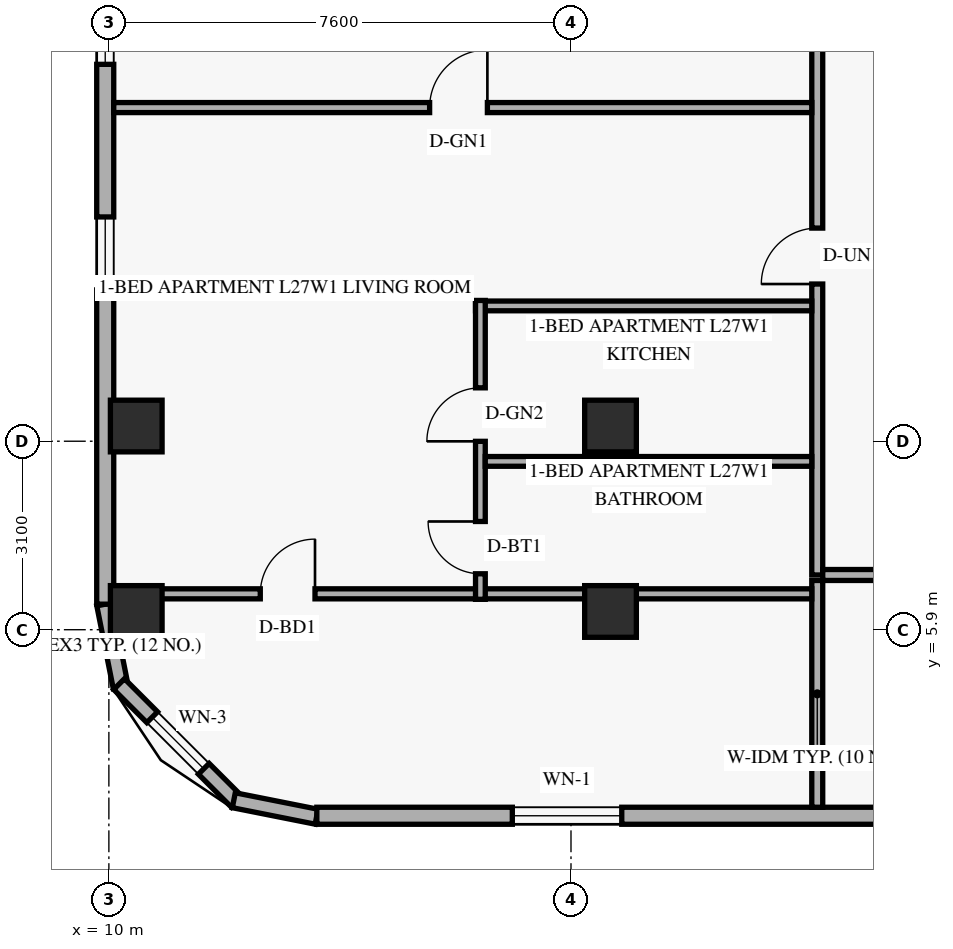
"""IFC4 building model, lengths in metres.
Left out: names, types, materials, properties, quantities, classifications, styles, units other than length and angle.
Written with IfcOpenShell. Run it as: python <this file> out.ifc"""

import sys

from ifc_helpers import new_model, si_unit, direction, frame, frame_2d, origin, origin_2d, place, context, subcontext, project, spatial, rectangle, extrude, element, fill, save


model = new_model("IFC4")
c1 = context("Model", 3, precision=1e-05, world=origin(), true_north=direction((0.0, 1.0)))
c2 = subcontext(c1, "Body", "Model", "MODEL_VIEW")
j1 = project(units=[si_unit("LENGTHUNIT", "METRE"), si_unit("PLANEANGLEUNIT", "RADIAN")], contexts=[c1])
p1 = place(None, origin())
s1 = spatial("IfcSite", under=j1, at=p1, CompositionType="ELEMENT")
p2 = place(p1, origin())
s2 = spatial("IfcBuilding", under=s1, at=p2, CompositionType="ELEMENT")
p3 = place(p2, frame((0.0, 0.0, 106.2)))
s3 = spatial("IfcBuildingStorey", under=s2, at=p3, CompositionType="ELEMENT", Elevation=106.2)
for number, where, z_axis, x_axis in (
    (1, (10.45, 6.2, 0.0), (0.0, 0.0, 1.0), (1.0, 0.0, 0.0)),
    (2, (10.45, 9.25, 0.0), (0.0, 0.0, 1.0), (1.0, 0.0, 0.0)),
    (3, (18.25, 6.2, 0.0), (0.0, 0.0, 1.0), (1.0, 0.0, 0.0)),
    (4, (18.25, 9.25, 0.0), (0.0, 0.0, 1.0), (1.0, 0.0, 0.0)),
):
    element("IfcColumn", number, at=place(p3, frame(where, z_axis=z_axis, x_axis=x_axis)), inside=s3, PredefinedType="COLUMN", context=c2, shape_type="SweptSolid", body=[
        extrude(rectangle(XDim=0.85, YDim=0.85, at=origin_2d()), origin(), (0.0, 0.0, 1.0), 3.6),
    ])
p4 = place(p3, frame((9.924, 6.316, 0.0), z_axis=(0.0, 0.0, 1.0), x_axis=(0.195000137217, -0.980803214965, 0.0)))
e5 = element("IfcWall", 5, at=p4, inside=s3, PredefinedType="SOLIDWALL", context=c2, shape_type="SweptSolid", body=[
    extrude(rectangle(XDim=1.388, YDim=0.25, at=frame_2d((0.694, 0.0))), origin(), (0.0, 0.0, 1.0), 3.36),
])
p5 = place(p3, frame((10.168, 5.005, 0.0), z_axis=(0.0, 0.0, 1.0), x_axis=(0.707151344399, -0.707062215165, 0.0)))
e6 = element("IfcWall", 6, at=p5, inside=s3, PredefinedType="SOLIDWALL", context=c2, shape_type="SweptSolid", body=[
    extrude(rectangle(XDim=2.739, YDim=0.25, at=frame_2d((1.37, 0.0))), origin(), (0.0, 0.0, 1.0), 3.36),
])
p6 = place(p5, frame((0.77, 0.0, 0.85)))
e7 = element("IfcOpeningElement", 7, at=p6, cuts=e6, PredefinedType="OPENING", context=c2, shape_type="SweptSolid", body=[
    extrude(rectangle(XDim=1.2, YDim=1.5, at=frame_2d((0.6, 0.75))), frame((0.0, 0.135, 0.0), z_axis=(0.0, -1.0, 0.0), x_axis=(1.0, 0.0, 0.0)), (0.0, 0.0, 1.0), 0.27),
])
p7 = place(p3, frame((12.054, 3.095, 0.0), z_axis=(0.0, 0.0, 1.0), x_axis=(0.980809899341, -0.19496651342, 0.0)))
e8 = element("IfcWall", 8, at=p7, inside=s3, PredefinedType="SOLIDWALL", context=c2, shape_type="SweptSolid", body=[
    extrude(rectangle(XDim=1.389, YDim=0.25, at=frame_2d((0.694, 0.0))), origin(), (0.0, 0.0, 1.0), 3.36),
])
p8 = place(p3, frame((13.42, 2.84, 0.0), z_axis=(0.0, 0.0, 1.0), x_axis=(1.0, 0.0, 0.0)))
e9 = element("IfcWall", 9, at=p8, inside=s3, PredefinedType="SOLIDWALL", context=c2, shape_type="SweptSolid", body=[
    extrude(rectangle(XDim=36.56, YDim=0.28, at=frame_2d((18.28, 0.0))), origin(), (0.0, 0.0, 1.0), 3.36),
])
p9 = place(p8, frame((3.215, 0.0, 0.85)))
e10 = element("IfcOpeningElement", 10, at=p9, cuts=e9, PredefinedType="OPENING", context=c2, shape_type="SweptSolid", body=[
    extrude(rectangle(XDim=1.8, YDim=1.6, at=frame_2d((0.9, 0.8))), frame((0.0, 0.15, 0.0), z_axis=(0.0, -1.0, 0.0), x_axis=(1.0, 0.0, 0.0)), (0.0, 0.0, 1.0), 0.3),
])
p10 = place(p8, frame((10.055, 0.0, 0.85)))
e11 = element("IfcOpeningElement", 11, at=p10, cuts=e9, PredefinedType="OPENING", context=c2, shape_type="SweptSolid", body=[
    extrude(rectangle(XDim=1.8, YDim=1.6, at=frame_2d((0.9, 0.8))), frame((0.0, 0.15, 0.0), z_axis=(0.0, -1.0, 0.0), x_axis=(1.0, 0.0, 0.0)), (0.0, 0.0, 1.0), 0.3),
])
p11 = place(p8, frame((16.94, 0.0, 0.85)))
e12 = element("IfcOpeningElement", 12, at=p11, cuts=e9, PredefinedType="OPENING", context=c2, shape_type="SweptSolid", body=[
    extrude(rectangle(XDim=1.8, YDim=1.6, at=frame_2d((0.9, 0.8))), frame((0.0, 0.15, 0.0), z_axis=(0.0, -1.0, 0.0), x_axis=(1.0, 0.0, 0.0)), (0.0, 0.0, 1.0), 0.3),
])
p12 = place(p8, frame((22.365, 0.0, 0.85)))
e13 = element("IfcOpeningElement", 13, at=p12, cuts=e9, PredefinedType="OPENING", context=c2, shape_type="SweptSolid", body=[
    extrude(rectangle(XDim=1.8, YDim=1.6, at=frame_2d((0.9, 0.8))), frame((0.0, 0.15, 0.0), z_axis=(0.0, -1.0, 0.0), x_axis=(1.0, 0.0, 0.0)), (0.0, 0.0, 1.0), 0.3),
])
p13 = place(p8, frame((27.455, 0.0, 0.85)))
e14 = element("IfcOpeningElement", 14, at=p13, cuts=e9, PredefinedType="OPENING", context=c2, shape_type="SweptSolid", body=[
    extrude(rectangle(XDim=1.8, YDim=1.6, at=frame_2d((0.9, 0.8))), frame((0.0, 0.15, 0.0), z_axis=(0.0, -1.0, 0.0), x_axis=(1.0, 0.0, 0.0)), (0.0, 0.0, 1.0), 0.3),
])
p14 = place(p8, frame((32.48, 0.0, 0.85)))
e15 = element("IfcOpeningElement", 15, at=p14, cuts=e9, PredefinedType="OPENING", context=c2, shape_type="SweptSolid", body=[
    extrude(rectangle(XDim=1.2, YDim=1.5, at=frame_2d((0.6, 0.75))), frame((0.0, 0.15, 0.0), z_axis=(0.0, -1.0, 0.0), x_axis=(1.0, 0.0, 0.0)), (0.0, 0.0, 1.0), 0.3),
])
p15 = place(p8, frame((34.37, 0.0, 0.85)))
e16 = element("IfcOpeningElement", 16, at=p15, cuts=e9, PredefinedType="OPENING", context=c2, shape_type="SweptSolid", body=[
    extrude(rectangle(XDim=1.8, YDim=1.6, at=frame_2d((0.9, 0.8))), frame((0.0, 0.15, 0.0), z_axis=(0.0, -1.0, 0.0), x_axis=(1.0, 0.0, 0.0)), (0.0, 0.0, 1.0), 0.3),
])
p16 = place(p3, frame((9.94, 41.68, 0.0), z_axis=(0.0, 0.0, 1.0), x_axis=(0.0, -1.0, 0.0)))
e17 = element("IfcWall", 17, at=p16, inside=s3, PredefinedType="SOLIDWALL", context=c2, shape_type="SweptSolid", body=[
    extrude(rectangle(XDim=35.36, YDim=0.28, at=frame_2d((17.68, 0.0))), origin(), (0.0, 0.0, 1.0), 3.36),
])
p17 = place(p16, frame((28.991, 0.0, 0.85)))
e18 = element("IfcOpeningElement", 18, at=p17, cuts=e17, PredefinedType="OPENING", context=c2, shape_type="SweptSolid", body=[
    extrude(rectangle(XDim=1.2, YDim=1.5, at=frame_2d((0.6, 0.75))), frame((0.0, 0.15, 0.0), z_axis=(0.0, -1.0, 0.0), x_axis=(1.0, 0.0, 0.0)), (0.0, 0.0, 1.0), 0.3),
])
p18 = place(p16, frame((25.281, 0.0, 0.85)))
e19 = element("IfcOpeningElement", 19, at=p18, cuts=e17, PredefinedType="OPENING", context=c2, shape_type="SweptSolid", body=[
    extrude(rectangle(XDim=1.2, YDim=1.5, at=frame_2d((0.6, 0.75))), frame((0.0, 0.15, 0.0), z_axis=(0.0, -1.0, 0.0), x_axis=(1.0, 0.0, 0.0)), (0.0, 0.0, 1.0), 0.3),
])
p19 = place(p16, frame((20.548, 0.0, 0.85)))
e20 = element("IfcOpeningElement", 20, at=p19, cuts=e17, PredefinedType="OPENING", context=c2, shape_type="SweptSolid", body=[
    extrude(rectangle(XDim=1.2, YDim=1.5, at=frame_2d((0.6, 0.75))), frame((0.0, 0.15, 0.0), z_axis=(0.0, -1.0, 0.0), x_axis=(1.0, 0.0, 0.0)), (0.0, 0.0, 1.0), 0.3),
])
p20 = place(p16, frame((14.663, 0.0, 0.85)))
e21 = element("IfcOpeningElement", 21, at=p20, cuts=e17, PredefinedType="OPENING", context=c2, shape_type="SweptSolid", body=[
    extrude(rectangle(XDim=1.2, YDim=1.5, at=frame_2d((0.6, 0.75))), frame((0.0, 0.15, 0.0), z_axis=(0.0, -1.0, 0.0), x_axis=(1.0, 0.0, 0.0)), (0.0, 0.0, 1.0), 0.3),
])
p21 = place(p16, frame((8.167, 0.0, 0.85)))
e22 = element("IfcOpeningElement", 22, at=p21, cuts=e17, PredefinedType="OPENING", context=c2, shape_type="SweptSolid", body=[
    extrude(rectangle(XDim=1.2, YDim=1.5, at=frame_2d((0.6, 0.75))), frame((0.0, 0.15, 0.0), z_axis=(0.0, -1.0, 0.0), x_axis=(1.0, 0.0, 0.0)), (0.0, 0.0, 1.0), 0.3),
])
p22 = place(p16, frame((4.846, 0.0, 0.85)))
e23 = element("IfcOpeningElement", 23, at=p22, cuts=e17, PredefinedType="OPENING", context=c2, shape_type="SweptSolid", body=[
    extrude(rectangle(XDim=1.2, YDim=1.5, at=frame_2d((0.6, 0.75))), frame((0.0, 0.15, 0.0), z_axis=(0.0, -1.0, 0.0), x_axis=(1.0, 0.0, 0.0)), (0.0, 0.0, 1.0), 0.3),
])
p23 = place(p3, frame((21.65, 6.8, 0.0), z_axis=(0.0, 0.0, 1.0), x_axis=(0.0, 1.0, 0.0)))
e24 = element("IfcWall", 24, at=p23, inside=s3, PredefinedType="STANDARD", context=c2, shape_type="SweptSolid", body=[
    extrude(rectangle(XDim=34.4, YDim=0.18, at=frame_2d((17.2, 0.0))), origin(), (0.0, 0.0, 1.0), 2.731),
])
p24 = place(p23, frame((4.785, 0.0, 0.0)))
e25 = element("IfcOpeningElement", 25, at=p24, cuts=e24, PredefinedType="OPENING", context=c2, shape_type="SweptSolid", body=[
    extrude(rectangle(XDim=0.92, YDim=2.15, at=frame_2d((0.46, 1.075))), frame((0.0, 0.1, 0.0), z_axis=(0.0, -1.0, 0.0), x_axis=(1.0, 0.0, 0.0)), (0.0, 0.0, 1.0), 0.2),
])
p25 = place(p23, frame((15.384, 0.0, 0.0)))
e26 = element("IfcOpeningElement", 26, at=p25, cuts=e24, PredefinedType="OPENING", context=c2, shape_type="SweptSolid", body=[
    extrude(rectangle(XDim=0.92, YDim=2.15, at=frame_2d((0.46, 1.075))), frame((0.0, 0.1, 0.0), z_axis=(0.0, -1.0, 0.0), x_axis=(1.0, 0.0, 0.0)), (0.0, 0.0, 1.0), 0.2),
])
p26 = place(p23, frame((28.41, 0.0, 0.0)))
e27 = element("IfcOpeningElement", 27, at=p26, cuts=e24, PredefinedType="OPENING", context=c2, shape_type="SweptSolid", body=[
    extrude(rectangle(XDim=0.92, YDim=2.15, at=frame_2d((0.46, 1.075))), frame((0.0, 0.1, 0.0), z_axis=(0.0, -1.0, 0.0), x_axis=(1.0, 0.0, 0.0)), (0.0, 0.0, 1.0), 0.2),
])
p27 = place(p3, frame((21.74, 6.8, 0.0), z_axis=(0.0, 0.0, 1.0), x_axis=(1.0, 0.0, 0.0)))
e28 = element("IfcWall", 28, at=p27, inside=s3, PredefinedType="STANDARD", context=c2, shape_type="SweptSolid", body=[
    extrude(rectangle(XDim=13.68, YDim=0.18, at=frame_2d((6.84, 0.0))), origin(), (0.0, 0.0, 1.0), 2.731),
])
p28 = place(p27, frame((0.97, 0.0, 0.0)))
e29 = element("IfcOpeningElement", 29, at=p28, cuts=e28, PredefinedType="OPENING", context=c2, shape_type="SweptSolid", body=[
    extrude(rectangle(XDim=0.95, YDim=2.15, at=frame_2d((0.475, 1.075))), frame((0.0, 0.1, 0.0), z_axis=(0.0, -1.0, 0.0), x_axis=(1.0, 0.0, 0.0)), (0.0, 0.0, 1.0), 0.2),
])
p29 = place(p27, frame((9.11, 0.0, 0.0)))
e30 = element("IfcOpeningElement", 30, at=p29, cuts=e28, PredefinedType="OPENING", context=c2, shape_type="SweptSolid", body=[
    extrude(rectangle(XDim=0.95, YDim=2.15, at=frame_2d((0.475, 1.075))), frame((0.0, 0.1, 0.0), z_axis=(0.0, -1.0, 0.0), x_axis=(1.0, 0.0, 0.0)), (0.0, 0.0, 1.0), 0.2),
])
p30 = place(p3, frame((21.65, 2.98, 0.0), z_axis=(0.0, 0.0, 1.0), x_axis=(0.0, 1.0, 0.0)))
e31 = element("IfcWall", 31, at=p30, inside=s3, PredefinedType="PARTITIONING", context=c2, shape_type="SweptSolid", body=[
    extrude(rectangle(XDim=3.73, YDim=0.18, at=frame_2d((1.865, 0.0))), origin(), (0.0, 0.0, 1.0), 2.809),
])
p31 = place(p3, frame((10.08, 6.49, 0.0), z_axis=(0.0, 0.0, 1.0), x_axis=(1.0, 0.0, 0.0)))
e32 = element("IfcWall", 32, at=p31, inside=s3, PredefinedType="PARTITIONING", context=c2, shape_type="SweptSolid", body=[
    extrude(rectangle(XDim=11.48, YDim=0.165, at=frame_2d((5.74, 0.0))), origin(), (0.0, 0.0, 1.0), 3.36),
])
p32 = place(p31, frame((2.41, 0.0, 0.0)))
e33 = element("IfcOpeningElement", 33, at=p32, cuts=e32, PredefinedType="OPENING", context=c2, shape_type="SweptSolid", body=[
    extrude(rectangle(XDim=0.9, YDim=2.14, at=frame_2d((0.45, 1.07))), frame((0.0, 0.093, 0.0), z_axis=(0.0, -1.0, 0.0), x_axis=(1.0, 0.0, 0.0)), (0.0, 0.0, 1.0), 0.185),
])
p33 = place(p3, frame((16.03, 11.226, 0.0), z_axis=(0.0, 0.0, 1.0), x_axis=(1.0, 0.0, 0.0)))
e34 = element("IfcWall", 34, at=p33, inside=s3, PredefinedType="PLUMBINGWALL", context=c2, shape_type="SweptSolid", body=[
    extrude(rectangle(XDim=5.53, YDim=0.16, at=frame_2d((2.765, 0.0))), origin(), (0.0, 0.0, 1.0), 2.731),
])
p34 = place(p3, frame((16.11, 6.4, 0.0), z_axis=(0.0, 0.0, 1.0), x_axis=(0.0, 1.0, 0.0)))
e35 = element("IfcWall", 35, at=p34, inside=s3, PredefinedType="PLUMBINGWALL", context=c2, shape_type="SweptSolid", body=[
    extrude(rectangle(XDim=4.916, YDim=0.16, at=frame_2d((2.458, 0.0))), origin(), (0.0, 0.0, 1.0), 2.731),
])
p35 = place(p34, frame((0.42, 0.0, 0.0)))
e36 = element("IfcOpeningElement", 36, at=p35, cuts=e35, PredefinedType="OPENING", context=c2, shape_type="SweptSolid", body=[
    extrude(rectangle(XDim=0.86, YDim=2.12, at=frame_2d((0.43, 1.06))), frame((0.0, 0.09, 0.0), z_axis=(0.0, -1.0, 0.0), x_axis=(1.0, 0.0, 0.0)), (0.0, 0.0, 1.0), 0.18),
])
p36 = place(p34, frame((2.598, 0.0, 0.0)))
e37 = element("IfcOpeningElement", 37, at=p36, cuts=e35, PredefinedType="OPENING", context=c2, shape_type="SweptSolid", body=[
    extrude(rectangle(XDim=0.88, YDim=2.12, at=frame_2d((0.44, 1.06))), frame((0.0, 0.09, 0.0), z_axis=(0.0, -1.0, 0.0), x_axis=(1.0, 0.0, 0.0)), (0.0, 0.0, 1.0), 0.18),
])
p37 = place(p3, frame((16.19, 8.668, 0.0), z_axis=(0.0, 0.0, 1.0), x_axis=(1.0, 0.0, 0.0)))
e38 = element("IfcWall", 38, at=p37, inside=s3, PredefinedType="PLUMBINGWALL", context=c2, shape_type="SweptSolid", body=[
    extrude(rectangle(XDim=5.37, YDim=0.16, at=frame_2d((2.685, 0.0))), origin(), (0.0, 0.0, 1.0), 2.731),
])
p38 = place(p3, frame((10.08, 14.488, 0.0), z_axis=(0.0, 0.0, 1.0), x_axis=(1.0, 0.0, 0.0)))
e39 = element("IfcWall", 39, at=p38, inside=s3, PredefinedType="PARTITIONING", context=c2, shape_type="SweptSolid", body=[
    extrude(rectangle(XDim=11.48, YDim=0.165, at=frame_2d((5.74, 0.0))), origin(), (0.0, 0.0, 1.0), 2.731),
])
p39 = place(p38, frame((5.195, 0.0, 0.0)))
e40 = element("IfcOpeningElement", 40, at=p39, cuts=e39, PredefinedType="OPENING", context=c2, shape_type="SweptSolid", body=[
    extrude(rectangle(XDim=0.95, YDim=2.15, at=frame_2d((0.475, 1.075))), frame((0.0, 0.093, 0.0), z_axis=(0.0, -1.0, 0.0), x_axis=(1.0, 0.0, 0.0)), (0.0, 0.0, 1.0), 0.185),
])
p40 = place(p6, origin())
e41 = element("IfcWindow", 41, at=p40, inside=s3, PartitioningType="SINGLE_PANEL", PredefinedType="WINDOW", context=c2, shape_type="SweptSolid", body=[
    extrude(rectangle(XDim=1.2, YDim=1.5, at=frame_2d((0.6, 0.75))), frame((0.0, 0.03, 0.0), z_axis=(0.0, -1.0, 0.0), x_axis=(1.0, 0.0, 0.0)), (0.0, 0.0, 1.0), 0.06),
])
fill(e7, e41)
p41 = place(p9, origin())
e42 = element("IfcWindow", 42, at=p41, inside=s3, PartitioningType="SINGLE_PANEL", PredefinedType="WINDOW", context=c2, shape_type="SweptSolid", body=[
    extrude(rectangle(XDim=1.8, YDim=1.6, at=frame_2d((0.9, 0.8))), frame((0.0, 0.03, 0.0), z_axis=(0.0, -1.0, 0.0), x_axis=(1.0, 0.0, 0.0)), (0.0, 0.0, 1.0), 0.06),
])
fill(e10, e42)
p42 = place(p17, origin())
e43 = element("IfcWindow", 43, at=p42, inside=s3, PartitioningType="SINGLE_PANEL", PredefinedType="WINDOW", context=c2, shape_type="SweptSolid", body=[
    extrude(rectangle(XDim=1.2, YDim=1.5, at=frame_2d((0.6, 0.75))), frame((0.0, 0.03, 0.0), z_axis=(0.0, -1.0, 0.0), x_axis=(1.0, 0.0, 0.0)), (0.0, 0.0, 1.0), 0.06),
])
fill(e18, e43)
p43 = place(p18, origin())
e44 = element("IfcWindow", 44, at=p43, inside=s3, PartitioningType="SINGLE_PANEL", PredefinedType="WINDOW", context=c2, shape_type="SweptSolid", body=[
    extrude(rectangle(XDim=1.2, YDim=1.5, at=frame_2d((0.6, 0.75))), frame((0.0, 0.03, 0.0), z_axis=(0.0, -1.0, 0.0), x_axis=(1.0, 0.0, 0.0)), (0.0, 0.0, 1.0), 0.06),
])
fill(e19, e44)
p44 = place(p39, origin())
e45 = element("IfcDoor", 45, at=p44, inside=s3, OperationType="SINGLE_SWING_RIGHT", PredefinedType="DOOR", context=c2, shape_type="SweptSolid", body=[
    extrude(rectangle(XDim=0.95, YDim=2.15, at=frame_2d((0.475, 1.075))), frame((0.0, 0.025, 0.0), z_axis=(0.0, -1.0, 0.0), x_axis=(1.0, 0.0, 0.0)), (0.0, 0.0, 1.0), 0.05),
])
fill(e40, e45)
p45 = place(p24, origin())
e46 = element("IfcDoor", 46, at=p45, inside=s3, OperationType="SINGLE_SWING_LEFT", PredefinedType="DOOR", context=c2, shape_type="SweptSolid", body=[
    extrude(rectangle(XDim=0.92, YDim=2.15, at=frame_2d((0.46, 1.075))), frame((0.0, 0.025, 0.0), z_axis=(0.0, -1.0, 0.0), x_axis=(1.0, 0.0, 0.0)), (0.0, 0.0, 1.0), 0.05),
])
fill(e25, e46)
p46 = place(p35, origin())
e47 = element("IfcDoor", 47, at=p46, inside=s3, OperationType="SINGLE_SWING_RIGHT", PredefinedType="DOOR", context=c2, shape_type="SweptSolid", body=[
    extrude(rectangle(XDim=0.86, YDim=2.12, at=frame_2d((0.43, 1.06))), frame((0.0, 0.025, 0.0), z_axis=(0.0, -1.0, 0.0), x_axis=(1.0, 0.0, 0.0)), (0.0, 0.0, 1.0), 0.05),
])
fill(e36, e47)
p47 = place(p36, origin())
e48 = element("IfcDoor", 48, at=p47, inside=s3, OperationType="SINGLE_SWING_LEFT", PredefinedType="DOOR", context=c2, shape_type="SweptSolid", body=[
    extrude(rectangle(XDim=0.88, YDim=2.12, at=frame_2d((0.44, 1.06))), frame((0.0, 0.025, 0.0), z_axis=(0.0, -1.0, 0.0), x_axis=(1.0, 0.0, 0.0)), (0.0, 0.0, 1.0), 0.05),
])
fill(e37, e48)
p48 = place(p32, origin())
e49 = element("IfcDoor", 49, at=p48, inside=s3, OperationType="SINGLE_SWING_RIGHT", PredefinedType="DOOR", context=c2, shape_type="SweptSolid", body=[
    extrude(rectangle(XDim=0.9, YDim=2.14, at=frame_2d((0.45, 1.07))), frame((0.0, 0.025, 0.0), z_axis=(0.0, -1.0, 0.0), x_axis=(1.0, 0.0, 0.0)), (0.0, 0.0, 1.0), 0.05),
])
fill(e33, e49)
save(model, sys.argv[1])
